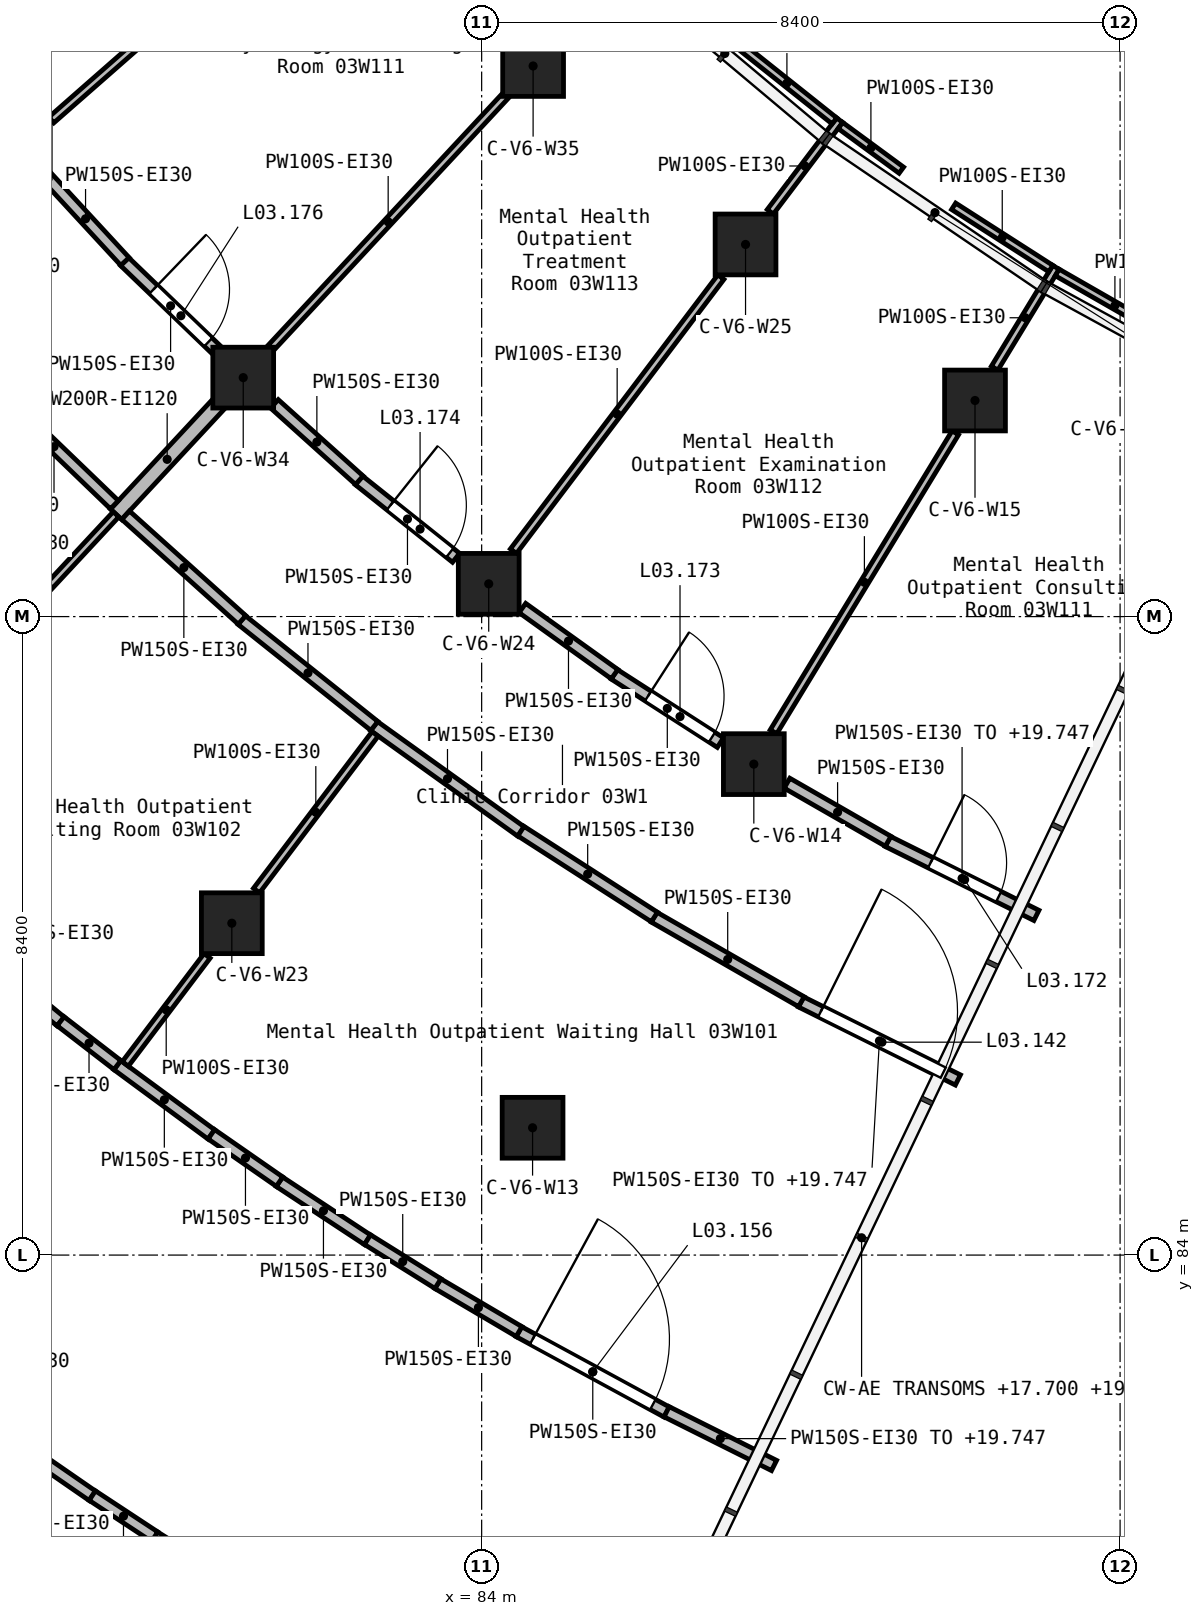
"""IFC4 building model, lengths in metres.
Left out: names, types, materials, properties, quantities, classifications, styles, units other than length and angle.
Written with IfcOpenShell. Run it as: python <this file> out.ifc"""

import sys

from ifc_helpers import new_model, si_unit, direction, frame, frame_2d, origin, origin_2d, place, context, subcontext, project, spatial, rectangle, extrude, element, fill, save


model = new_model("IFC4")
c1 = context("Model", 3, precision=1e-05, world=origin(), true_north=direction((0.0, 1.0)))
c2 = subcontext(c1, "Body", "Model", "MODEL_VIEW")
j1 = project(units=[si_unit("LENGTHUNIT", "METRE"), si_unit("PLANEANGLEUNIT", "RADIAN")], contexts=[c1])
p1 = place(None, origin())
s1 = spatial("IfcSite", under=j1, at=p1, CompositionType="ELEMENT")
p2 = place(p1, origin())
s2 = spatial("IfcBuilding", under=s1, at=p2, CompositionType="ELEMENT")
p3 = place(p2, frame((0.0, 0.0, 16.8)))
s3 = spatial("IfcBuildingStorey", under=s2, at=p3, CompositionType="ELEMENT", Elevation=16.8)
for number, where, z_axis, x_axis in (
    (1, (80.713, 88.366, 0.0), (0.0, 0.0, 1.0), (1.0, 0.0, 0.0)),
    (2, (80.863, 95.544, 0.0), (0.0, 0.0, 1.0), (1.0, 0.0, 0.0)),
    (3, (84.093, 92.831, 0.0), (0.0, 0.0, 1.0), (1.0, 0.0, 0.0)),
    (4, (84.67, 85.675, 0.0), (0.0, 0.0, 1.0), (1.0, 0.0, 0.0)),
    (5, (84.677, 99.644, 0.0), (0.0, 0.0, 1.0), (1.0, 0.0, 0.0)),
    (6, (87.472, 97.296, 0.0), (0.0, 0.0, 1.0), (1.0, 0.0, 0.0)),
    (7, (87.581, 90.459, 0.0), (0.0, 0.0, 1.0), (1.0, 0.0, 0.0)),
    (8, (90.491, 95.243, 0.0), (0.0, 0.0, 1.0), (1.0, 0.0, 0.0)),
):
    element("IfcColumn", number, at=place(p3, frame(where, z_axis=z_axis, x_axis=x_axis)), inside=s3, PredefinedType="COLUMN", context=c2, shape_type="SweptSolid", body=[
        extrude(rectangle(XDim=0.8, YDim=0.8, at=origin_2d()), origin(), (0.0, 0.0, 1.0), 4.2),
    ])
p4 = place(p3, frame((79.19, 93.746, 0.0), z_axis=(0.0, 0.0, 1.0), x_axis=(0.681171780306, 0.732123627344, 0.0)))
e9 = element("IfcWall", 9, at=p4, inside=s3, PredefinedType="SOLIDWALL", context=c2, shape_type="SweptSolid", body=[
    extrude(rectangle(XDim=1.974, YDim=0.2, at=frame_2d((0.987, 0.0))), origin(), (0.0, 0.0, 1.0), 3.9),
])
p5 = place(p3, frame((88.201, 87.331, 0.0), z_axis=(0.0, 0.0, 1.0), x_axis=(0.895335597875, -0.445392149883, 0.0)))
e10 = element("IfcWall", 10, at=p5, inside=s3, PredefinedType="PARTITIONING", context=c2, shape_type="SweptSolid", body=[
    extrude(rectangle(XDim=2.307, YDim=0.15, at=frame_2d((1.153, 0.0))), origin(), (0.0, 0.0, 1.0), 2.947),
])
p6 = place(p5, frame((0.291, 0.0, 0.0)))
e11 = element("IfcOpeningElement", 11, at=p6, cuts=e10, PredefinedType="OPENING", context=c2, shape_type="SweptSolid", body=[
    extrude(rectangle(XDim=1.8, YDim=2.1, at=frame_2d((0.9, 1.05))), frame((0.0, 0.085, 0.0), z_axis=(0.0, -1.0, 0.0), x_axis=(1.0, 0.0, 0.0)), (0.0, 0.0, 1.0), 0.17),
])
p7 = place(p3, frame((82.583, 90.961, 0.0), z_axis=(0.0, 0.0, 1.0), x_axis=(0.812456963848, -0.583021167622, 0.0)))
e12 = element("IfcWall", 12, at=p7, inside=s3, PredefinedType="PARTITIONING", context=c2, shape_type="SweptSolid", body=[
    extrude(rectangle(XDim=2.381, YDim=0.15, at=frame_2d((1.191, 0.0))), origin(), (0.0, 0.0, 1.0), 3.9),
])
p8 = place(p3, frame((80.841, 92.356, 0.0), z_axis=(0.0, 0.0, 1.0), x_axis=(0.781561025488, -0.62382879337, 0.0)))
e13 = element("IfcWall", 13, at=p8, inside=s3, PredefinedType="PARTITIONING", context=c2, shape_type="SweptSolid", body=[
    extrude(rectangle(XDim=2.235, YDim=0.15, at=frame_2d((1.118, 0.0))), origin(), (0.0, 0.0, 1.0), 3.9),
])
p9 = place(p3, frame((77.579, 95.4, 0.0), z_axis=(0.0, 0.0, 1.0), x_axis=(0.720594722174, -0.693356507415, 0.0)))
e14 = element("IfcWall", 14, at=p9, inside=s3, PredefinedType="PARTITIONING", context=c2, shape_type="SweptSolid", body=[
    extrude(rectangle(XDim=2.205, YDim=0.15, at=frame_2d((1.103, 0.0))), origin(), (0.0, 0.0, 1.0), 3.9),
])
p10 = place(p3, frame((86.268, 88.446, 0.0), z_axis=(0.0, 0.0, 1.0), x_axis=(0.867212921502, -0.497937494852, 0.0)))
e15 = element("IfcWall", 15, at=p10, inside=s3, PredefinedType="PARTITIONING", context=c2, shape_type="SweptSolid", body=[
    extrude(rectangle(XDim=2.235, YDim=0.15, at=frame_2d((1.118, 0.0))), origin(), (0.0, 0.0, 1.0), 3.9),
])
p11 = place(p3, frame((79.316, 93.733, 0.0), z_axis=(0.0, 0.0, 1.0), x_axis=(0.74346507851, -0.668774758073, 0.0)))
e16 = element("IfcWall", 16, at=p11, inside=s3, PredefinedType="PARTITIONING", context=c2, shape_type="SweptSolid", body=[
    extrude(rectangle(XDim=2.059, YDim=0.15, at=frame_2d((1.03, 0.0))), origin(), (0.0, 0.0, 1.0), 3.9),
])
p12 = place(p3, frame((84.517, 89.577, 0.0), z_axis=(0.0, 0.0, 1.0), x_axis=(0.840935250807, -0.541135753717, 0.0)))
e17 = element("IfcWall", 17, at=p12, inside=s3, PredefinedType="PARTITIONING", context=c2, shape_type="SweptSolid", body=[
    extrude(rectangle(XDim=2.088, YDim=0.15, at=frame_2d((1.044, 0.0))), origin(), (0.0, 0.0, 1.0), 3.9),
])
p13 = place(p3, frame((82.385, 94.194, 0.0), z_axis=(0.0, 0.0, 1.0), x_axis=(0.781756052881, -0.623584375833, 0.0)))
e18 = element("IfcWall", 18, at=p13, inside=s3, PredefinedType="PARTITIONING", context=c2, shape_type="SweptSolid", body=[
    extrude(rectangle(XDim=1.636, YDim=0.15, at=frame_2d((0.818, 0.0))), origin(), (0.0, 0.0, 1.0), 3.9),
])
p14 = place(p13, frame((0.53, 0.0, 0.0)))
e19 = element("IfcOpeningElement", 19, at=p14, cuts=e18, PredefinedType="OPENING", context=c2, shape_type="SweptSolid", body=[
    extrude(rectangle(XDim=1.0, YDim=2.1, at=frame_2d((0.5, 1.05))), frame((0.0, 0.085, 0.0), z_axis=(0.0, -1.0, 0.0), x_axis=(1.0, 0.0, 0.0)), (0.0, 0.0, 1.0), 0.17),
])
p15 = place(p3, frame((89.343, 89.442, 0.0), z_axis=(0.0, 0.0, 1.0), x_axis=(0.895274815557, -0.445514314731, 0.0)))
e20 = element("IfcWall", 20, at=p15, inside=s3, PredefinedType="PARTITIONING", context=c2, shape_type="SweptSolid", body=[
    extrude(rectangle(XDim=2.185, YDim=0.15, at=frame_2d((1.092, 0.0))), origin(), (0.0, 0.0, 1.0), 2.947),
])
p16 = place(p15, frame((0.63, 0.0, 0.0)))
e21 = element("IfcOpeningElement", 21, at=p16, cuts=e20, PredefinedType="OPENING", context=c2, shape_type="SweptSolid", body=[
    extrude(rectangle(XDim=1.0, YDim=2.1, at=frame_2d((0.5, 1.05))), frame((0.0, 0.085, 0.0), z_axis=(0.0, -1.0, 0.0), x_axis=(1.0, 0.0, 0.0)), (0.0, 0.0, 1.0), 0.17),
])
p17 = place(p3, frame((85.744, 91.642, 0.0), z_axis=(0.0, 0.0, 1.0), x_axis=(0.840848932624, -0.54126987031, 0.0)))
e22 = element("IfcWall", 22, at=p17, inside=s3, PredefinedType="PARTITIONING", context=c2, shape_type="SweptSolid", body=[
    extrude(rectangle(XDim=1.662, YDim=0.15, at=frame_2d((0.831, 0.0))), origin(), (0.0, 0.0, 1.0), 3.9),
])
p18 = place(p17, frame((0.53, 0.0, 0.0)))
e23 = element("IfcOpeningElement", 23, at=p18, cuts=e22, PredefinedType="OPENING", context=c2, shape_type="SweptSolid", body=[
    extrude(rectangle(XDim=1.0, YDim=2.1, at=frame_2d((0.5, 1.05))), frame((0.0, 0.085, 0.0), z_axis=(0.0, -1.0, 0.0), x_axis=(1.0, 0.0, 0.0)), (0.0, 0.0, 1.0), 0.17),
])
p19 = place(p3, frame((79.301, 97.072, 0.0), z_axis=(0.0, 0.0, 1.0), x_axis=(0.720465115712, -0.69349118022, 0.0)))
e24 = element("IfcWall", 24, at=p19, inside=s3, PredefinedType="PARTITIONING", context=c2, shape_type="SweptSolid", body=[
    extrude(rectangle(XDim=1.684, YDim=0.15, at=frame_2d((0.842, 0.0))), origin(), (0.0, 0.0, 1.0), 3.9),
])
p20 = place(p19, frame((0.53, 0.0, 0.0)))
e25 = element("IfcOpeningElement", 25, at=p20, cuts=e24, PredefinedType="OPENING", context=c2, shape_type="SweptSolid", body=[
    extrude(rectangle(XDim=1.0, YDim=2.1, at=frame_2d((0.5, 1.05))), frame((0.0, 0.085, 0.0), z_axis=(0.0, -1.0, 0.0), x_axis=(1.0, 0.0, 0.0)), (0.0, 0.0, 1.0), 0.17),
])
p21 = place(p3, frame((84.536, 92.513, 0.0), z_axis=(0.0, 0.0, 1.0), x_axis=(0.81243891359, -0.583046320359, 0.0)))
e26 = element("IfcWall", 26, at=p21, inside=s3, PredefinedType="PARTITIONING", context=c2, shape_type="SweptSolid", body=[
    extrude(rectangle(XDim=1.493, YDim=0.15, at=frame_2d((0.747, 0.0))), origin(), (0.0, 0.0, 1.0), 3.9),
])
p22 = place(p3, frame((78.27, 98.195, 0.0), z_axis=(0.0, 0.0, 1.0), x_axis=(0.678273469528, -0.73480956753, 0.0)))
e27 = element("IfcWall", 27, at=p22, inside=s3, PredefinedType="PARTITIONING", context=c2, shape_type="SweptSolid", body=[
    extrude(rectangle(XDim=1.529, YDim=0.15, at=frame_2d((0.764, 0.0))), origin(), (0.0, 0.0, 1.0), 3.9),
])
p23 = place(p3, frame((88.018, 90.208, 0.0), z_axis=(0.0, 0.0, 1.0), x_axis=(0.867174234795, -0.498004865947, 0.0)))
e28 = element("IfcWall", 28, at=p23, inside=s3, PredefinedType="PARTITIONING", context=c2, shape_type="SweptSolid", body=[
    extrude(rectangle(XDim=1.535, YDim=0.15, at=frame_2d((0.768, 0.0))), origin(), (0.0, 0.0, 1.0), 3.9),
])
p24 = place(p3, frame((81.273, 95.199, 0.0), z_axis=(0.0, 0.0, 1.0), x_axis=(0.743576936712, -0.668650386368, 0.0)))
e29 = element("IfcWall", 29, at=p24, inside=s3, PredefinedType="PARTITIONING", context=c2, shape_type="SweptSolid", body=[
    extrude(rectangle(XDim=1.502, YDim=0.15, at=frame_2d((0.751, 0.0))), origin(), (0.0, 0.0, 1.0), 3.9),
])
p25 = place(p3, frame((84.489, 82.993, 0.0), z_axis=(0.0, 0.0, 1.0), x_axis=(0.878602388498, -0.47755402095, 0.0)))
e30 = element("IfcWall", 30, at=p25, inside=s3, PredefinedType="PARTITIONING", context=c2, shape_type="SweptSolid", body=[
    extrude(rectangle(XDim=2.215, YDim=0.15, at=frame_2d((1.107, 0.0))), origin(), (0.0, 0.0, 1.0), 3.9),
])
p26 = place(p25, frame((0.207, 0.0, 0.0)))
e31 = element("IfcOpeningElement", 31, at=p26, cuts=e30, PredefinedType="OPENING", context=c2, shape_type="SweptSolid", body=[
    extrude(rectangle(XDim=1.8, YDim=2.1, at=frame_2d((0.9, 1.05))), frame((0.0, 0.085, 0.0), z_axis=(0.0, -1.0, 0.0), x_axis=(1.0, 0.0, 0.0)), (0.0, 0.0, 1.0), 0.17),
])
p27 = place(p3, frame((77.051, 88.236, 0.0), z_axis=(0.0, 0.0, 1.0), x_axis=(0.771517511576, -0.636208086502, 0.0)))
e32 = element("IfcWall", 32, at=p27, inside=s3, PredefinedType="PARTITIONING", context=c2, shape_type="SweptSolid", body=[
    extrude(rectangle(XDim=1.828, YDim=0.15, at=frame_2d((0.914, 0.0))), origin(), (0.0, 0.0, 1.0), 3.9),
])
p28 = place(p3, frame((86.434, 81.939, 0.0), z_axis=(0.0, 0.0, 1.0), x_axis=(0.894365374208, -0.447337207728, 0.0)))
e33 = element("IfcWall", 33, at=p28, inside=s3, PredefinedType="PARTITIONING", context=c2, shape_type="SweptSolid", body=[
    extrude(rectangle(XDim=1.58, YDim=0.15, at=frame_2d((0.79, 0.0))), origin(), (0.0, 0.0, 1.0), 2.947),
])
p29 = place(p3, frame((79.206, 86.5, 0.0), z_axis=(0.0, 0.0, 1.0), x_axis=(0.804960127747, -0.593328907721, 0.0)))
e34 = element("IfcWall", 34, at=p29, inside=s3, PredefinedType="PARTITIONING", context=c2, shape_type="SweptSolid", body=[
    extrude(rectangle(XDim=1.539, YDim=0.15, at=frame_2d((0.77, 0.0))), origin(), (0.0, 0.0, 1.0), 3.9),
])
p30 = place(p3, frame((79.695, 80.295, 0.0), z_axis=(0.0, 0.0, 1.0), x_axis=(0.847541618724, -0.530728936964, 0.0)))
e35 = element("IfcWall", 35, at=p30, inside=s3, PredefinedType="PARTITIONING", context=c2, shape_type="SweptSolid", body=[
    extrude(rectangle(XDim=1.353, YDim=0.15, at=frame_2d((0.676, 0.0))), origin(), (0.0, 0.0, 1.0), 3.9),
])
p31 = place(p3, frame((77.653, 81.68, 0.0), z_axis=(0.0, 0.0, 1.0), x_axis=(0.822646640465, -0.568552992194, 0.0)))
e36 = element("IfcWall", 36, at=p31, inside=s3, PredefinedType="PARTITIONING", context=c2, shape_type="SweptSolid", body=[
    extrude(rectangle(XDim=1.488, YDim=0.15, at=frame_2d((0.744, 0.0))), origin(), (0.0, 0.0, 1.0), 3.9),
])
p32 = place(p3, frame((81.338, 84.965, 0.0), z_axis=(0.0, 0.0, 1.0), x_axis=(0.834958204617, -0.550313362134, 0.0)))
e37 = element("IfcWall", 37, at=p32, inside=s3, PredefinedType="PARTITIONING", context=c2, shape_type="SweptSolid", body=[
    extrude(rectangle(XDim=1.389, YDim=0.15, at=frame_2d((0.695, 0.0))), origin(), (0.0, 0.0, 1.0), 3.9),
])
p33 = place(p3, frame((83.422, 83.624, 0.0), z_axis=(0.0, 0.0, 1.0), x_axis=(0.861696583626, -0.507423883718, 0.0)))
e38 = element("IfcWall", 38, at=p33, inside=s3, PredefinedType="PARTITIONING", context=c2, shape_type="SweptSolid", body=[
    extrude(rectangle(XDim=1.242, YDim=0.15, at=frame_2d((0.621, 0.0))), origin(), (0.0, 0.0, 1.0), 3.9),
])
for number, where, z_axis, x_axis in (
    (39, (82.498, 84.203, 0.0), (0.0, 0.0, 1.0), (0.848, -0.529, 0.0)),
    (40, (80.444, 85.589, 0.0), (0.0, 0.0, 1.0), (0.821, -0.571, 0.0)),
):
    element("IfcWall", number, at=place(p3, frame(where, z_axis=z_axis, x_axis=x_axis)), inside=s3, PredefinedType="PARTITIONING", context=c2, shape_type="SweptSolid", body=[
        extrude(rectangle(XDim=1.093, YDim=0.15, at=frame_2d((0.546, 0.0))), origin(), (0.0, 0.0, 1.0), 3.9),
    ])
p34 = place(p3, frame((78.877, 80.836, 0.0), z_axis=(0.0, 0.0, 1.0), x_axis=(0.835209839134, -0.549931381733, 0.0)))
e41 = element("IfcWall", 41, at=p34, inside=s3, PredefinedType="PARTITIONING", context=c2, shape_type="SweptSolid", body=[
    extrude(rectangle(XDim=0.982, YDim=0.15, at=frame_2d((0.491, 0.0))), origin(), (0.0, 0.0, 1.0), 3.9),
])
p35 = place(p3, frame((78.46, 87.077, 0.0), z_axis=(0.0, 0.0, 1.0), x_axis=(0.791671493317, -0.610947008069, 0.0)))
e42 = element("IfcWall", 42, at=p35, inside=s3, PredefinedType="PARTITIONING", context=c2, shape_type="SweptSolid", body=[
    extrude(rectangle(XDim=0.944, YDim=0.15, at=frame_2d((0.472, 0.0))), origin(), (0.0, 0.0, 1.0), 3.9),
])
p36 = place(p3, frame((84.418, 93.26, 0.0), z_axis=(0.0, 0.0, 1.0), x_axis=(0.603501117064, 0.797362152163, 0.0)))
e43 = element("IfcWall", 43, at=p36, inside=s3, PredefinedType="PARTITIONING", context=c2, shape_type="SweptSolid", body=[
    extrude(rectangle(XDim=4.522, YDim=0.1, at=frame_2d((2.261, 0.0))), origin(), (0.0, 0.0, 1.0), 3.9),
])
p37 = place(p3, frame((87.798, 97.726, 0.0), z_axis=(0.0, 0.0, 1.0), x_axis=(0.603534256712, 0.797337068607, 0.0)))
e44 = element("IfcWall", 44, at=p37, inside=s3, PredefinedType="PARTITIONING", context=c2, shape_type="SweptSolid", body=[
    extrude(rectangle(XDim=1.512, YDim=0.1, at=frame_2d((0.756, 0.0))), origin(), (0.0, 0.0, 1.0), 3.9),
])
p38 = place(p3, frame((78.338, 98.933, 0.0), z_axis=(0.0, 0.0, 1.0), x_axis=(0.751823288541, 0.659364650863, 0.0)))
e45 = element("IfcWall", 45, at=p38, inside=s3, PredefinedType="PARTITIONING", context=c2, shape_type="SweptSolid", body=[
    extrude(rectangle(XDim=4.5, YDim=0.1, at=frame_2d((2.25, 0.0))), origin(), (0.0, 0.0, 1.0), 3.9),
])
p39 = place(p3, frame((87.84, 90.885, 0.0), z_axis=(0.0, 0.0, 1.0), x_axis=(0.519618801015, 0.854398210223, 0.0)))
e46 = element("IfcWall", 46, at=p39, inside=s3, PredefinedType="PARTITIONING", context=c2, shape_type="SweptSolid", body=[
    extrude(rectangle(XDim=4.603, YDim=0.1, at=frame_2d((2.302, 0.0))), origin(), (0.0, 0.0, 1.0), 3.9),
])
p40 = place(p3, frame((90.75, 95.668, 0.0), z_axis=(0.0, 0.0, 1.0), x_axis=(0.519552672181, 0.854438424247, 0.0)))
e47 = element("IfcWall", 47, at=p40, inside=s3, PredefinedType="PARTITIONING", context=c2, shape_type="SweptSolid", body=[
    extrude(rectangle(XDim=1.552, YDim=0.1, at=frame_2d((0.776, 0.0))), origin(), (0.0, 0.0, 1.0), 3.9),
])
p41 = place(p3, frame((81.227, 95.935, 0.0), z_axis=(0.0, 0.0, 1.0), x_axis=(0.681211440492, 0.732086725288, 0.0)))
e48 = element("IfcWall", 48, at=p41, inside=s3, PredefinedType="PARTITIONING", context=c2, shape_type="SweptSolid", body=[
    extrude(rectangle(XDim=4.53, YDim=0.1, at=frame_2d((2.265, 0.0))), origin(), (0.0, 0.0, 1.0), 3.9),
])
p42 = place(p3, frame((77.412, 91.835, 0.0), z_axis=(0.0, 0.0, 1.0), x_axis=(0.681147107729, 0.732146582067, 0.0)))
e49 = element("IfcWall", 49, at=p42, inside=s3, PredefinedType="PARTITIONING", context=c2, shape_type="SweptSolid", body=[
    extrude(rectangle(XDim=2.609, YDim=0.1, at=frame_2d((1.304, 0.0))), origin(), (0.0, 0.0, 1.0), 3.9),
])
p43 = place(p3, frame((79.312, 86.515, 0.0), z_axis=(0.0, 0.0, 1.0), x_axis=(0.603588624137, 0.797295912954, 0.0)))
e50 = element("IfcWall", 50, at=p43, inside=s3, PredefinedType="PARTITIONING", context=c2, shape_type="SweptSolid", body=[
    extrude(rectangle(XDim=1.782, YDim=0.1, at=frame_2d((0.891, 0.0))), origin(), (0.0, 0.0, 1.0), 3.9),
])
p44 = place(p3, frame((81.038, 88.796, 0.0), z_axis=(0.0, 0.0, 1.0), x_axis=(0.603561177332, 0.797316690668, 0.0)))
e51 = element("IfcWall", 51, at=p44, inside=s3, PredefinedType="PARTITIONING", context=c2, shape_type="SweptSolid", body=[
    extrude(rectangle(XDim=2.584, YDim=0.1, at=frame_2d((1.292, 0.0))), origin(), (0.0, 0.0, 1.0), 3.9),
])
p45 = place(p3, frame((91.572, 96.928, 0.0), z_axis=(0.0, 0.0, 1.0), x_axis=(0.867607434085, -0.497249776591, 0.0)))
e52 = element("IfcWall", 52, at=p45, inside=s3, PredefinedType="PARTITIONING", context=c2, shape_type="SweptSolid", body=[
    extrude(rectangle(XDim=1.751, YDim=0.1, at=frame_2d((0.875, 0.0))), origin(), (0.0, 0.0, 1.0), 3.9),
])
p46 = place(p3, frame((87.391, 99.916, 0.0), z_axis=(0.0, 0.0, 1.0), x_axis=(0.7827431138, -0.622344934742, 0.0)))
e53 = element("IfcWall", 53, at=p46, inside=s3, PredefinedType="PARTITIONING", context=c2, shape_type="SweptSolid", body=[
    extrude(rectangle(XDim=1.598, YDim=0.1, at=frame_2d((0.799, 0.0))), origin(), (0.0, 0.0, 1.0), 3.9),
])
p47 = place(p3, frame((90.21, 97.798, 0.0), z_axis=(0.0, 0.0, 1.0), x_axis=(0.841976481819, -0.539514229713, 0.0)))
e54 = element("IfcWall", 54, at=p47, inside=s3, PredefinedType="PARTITIONING", context=c2, shape_type="SweptSolid", body=[
    extrude(rectangle(XDim=1.519, YDim=0.1, at=frame_2d((0.76, 0.0))), origin(), (0.0, 0.0, 1.0), 3.9),
])
p48 = place(p3, frame((88.721, 98.861, 0.0), z_axis=(0.0, 0.0, 1.0), x_axis=(0.806061198055, -0.591832193269, 0.0)))
e55 = element("IfcWall", 55, at=p48, inside=s3, PredefinedType="PARTITIONING", context=c2, shape_type="SweptSolid", body=[
    extrude(rectangle(XDim=0.994, YDim=0.1, at=frame_2d((0.497, 0.0))), origin(), (0.0, 0.0, 1.0), 3.9),
])
p49 = place(p6, origin())
e56 = element("IfcDoor", 56, at=p49, inside=s3, OperationType="DOUBLE_DOOR_SINGLE_SWING", PredefinedType="DOOR", context=c2, shape_type="SweptSolid", body=[
    extrude(rectangle(XDim=1.8, YDim=2.1, at=frame_2d((0.9, 1.05))), frame((0.0, 0.025, 0.0), z_axis=(0.0, -1.0, 0.0), x_axis=(1.0, 0.0, 0.0)), (0.0, 0.0, 1.0), 0.05),
])
fill(e11, e56)
p50 = place(p26, frame((1.8, 0.0, 0.0), z_axis=(0.0, 0.0, 1.0), x_axis=(-1.0, 0.0, 0.0)))
e57 = element("IfcDoor", 57, at=p50, inside=s3, OperationType="DOUBLE_DOOR_SINGLE_SWING", PredefinedType="DOOR", context=c2, shape_type="SweptSolid", body=[
    extrude(rectangle(XDim=1.8, YDim=2.1, at=frame_2d((0.9, 1.05))), frame((0.0, 0.025, 0.0), z_axis=(0.0, -1.0, 0.0), x_axis=(1.0, 0.0, 0.0)), (0.0, 0.0, 1.0), 0.05),
])
fill(e31, e57)
p51 = place(p16, origin())
e58 = element("IfcDoor", 58, at=p51, inside=s3, OperationType="SINGLE_SWING_RIGHT", PredefinedType="DOOR", context=c2, shape_type="SweptSolid", body=[
    extrude(rectangle(XDim=1.0, YDim=2.1, at=frame_2d((0.5, 1.05))), frame((0.0, 0.025, 0.0), z_axis=(0.0, -1.0, 0.0), x_axis=(1.0, 0.0, 0.0)), (0.0, 0.0, 1.0), 0.05),
])
fill(e21, e58)
p52 = place(p18, origin())
e59 = element("IfcDoor", 59, at=p52, inside=s3, OperationType="SINGLE_SWING_RIGHT", PredefinedType="DOOR", context=c2, shape_type="SweptSolid", body=[
    extrude(rectangle(XDim=1.0, YDim=2.1, at=frame_2d((0.5, 1.05))), frame((0.0, 0.025, 0.0), z_axis=(0.0, -1.0, 0.0), x_axis=(1.0, 0.0, 0.0)), (0.0, 0.0, 1.0), 0.05),
])
fill(e23, e59)
p53 = place(p14, origin())
e60 = element("IfcDoor", 60, at=p53, inside=s3, OperationType="SINGLE_SWING_RIGHT", PredefinedType="DOOR", context=c2, shape_type="SweptSolid", body=[
    extrude(rectangle(XDim=1.0, YDim=2.1, at=frame_2d((0.5, 1.05))), frame((0.0, 0.025, 0.0), z_axis=(0.0, -1.0, 0.0), x_axis=(1.0, 0.0, 0.0)), (0.0, 0.0, 1.0), 0.05),
])
fill(e19, e60)
p54 = place(p20, origin())
e61 = element("IfcDoor", 61, at=p54, inside=s3, OperationType="SINGLE_SWING_RIGHT", PredefinedType="DOOR", context=c2, shape_type="SweptSolid", body=[
    extrude(rectangle(XDim=1.0, YDim=2.1, at=frame_2d((0.5, 1.05))), frame((0.0, 0.025, 0.0), z_axis=(0.0, -1.0, 0.0), x_axis=(1.0, 0.0, 0.0)), (0.0, 0.0, 1.0), 0.05),
])
fill(e25, e61)
save(model, sys.argv[1])
